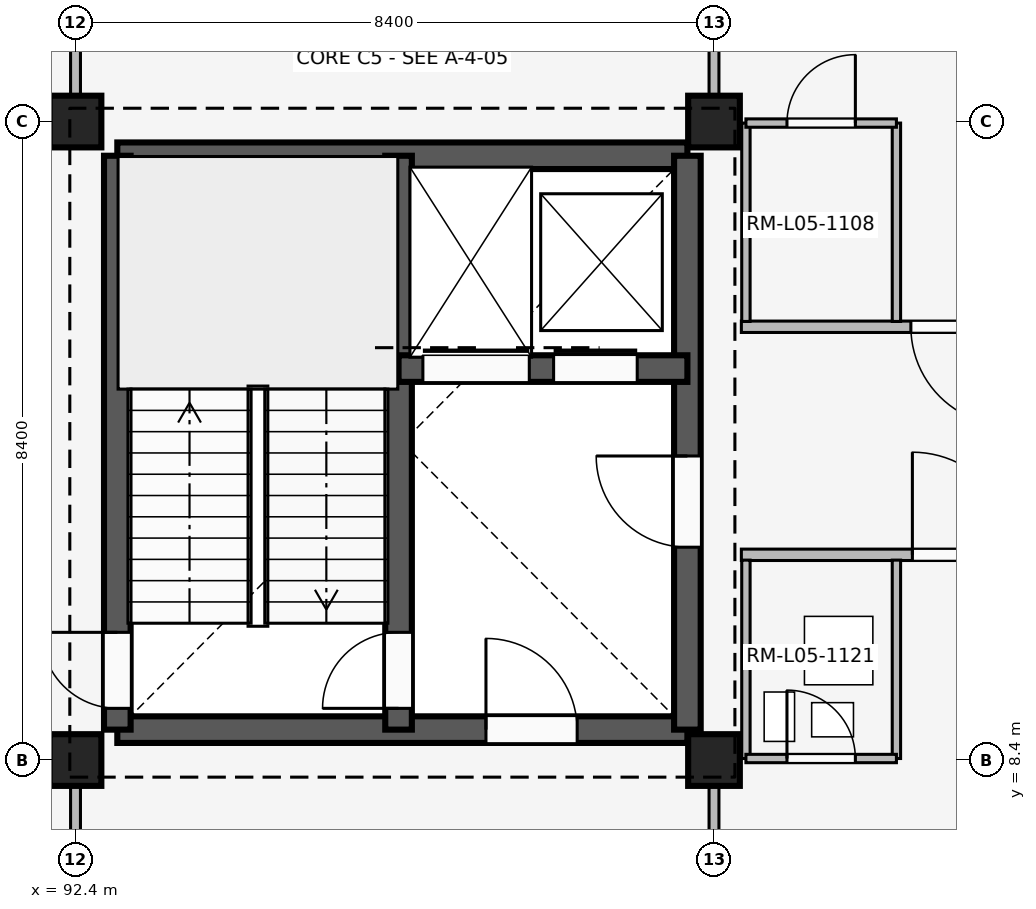
"""IFC4 building model, lengths in metres.
Left out: names, types, materials, properties, quantities, classifications, styles, units other than length and angle.
Written with IfcOpenShell. Run it as: python <this file> out.ifc"""

import sys

from ifc_helpers import new_model, si_unit, direction, frame, frame_2d, origin, origin_2d, place, context, subcontext, project, spatial, rectangle, extrude, element, fill, save


model = new_model("IFC4")
c1 = context("Model", 3, precision=1e-05, world=origin(), true_north=direction((0.0, 1.0)))
c2 = subcontext(c1, "Body", "Model", "MODEL_VIEW")
j1 = project(units=[si_unit("LENGTHUNIT", "METRE"), si_unit("PLANEANGLEUNIT", "RADIAN")], contexts=[c1])
p1 = place(None, origin())
s1 = spatial("IfcSite", under=j1, at=p1, CompositionType="ELEMENT")
p2 = place(p1, origin())
s2 = spatial("IfcBuilding", under=s1, at=p2, CompositionType="ELEMENT")
p3 = place(p2, frame((0.0, 0.0, 20.4)))
s3 = spatial("IfcBuildingStorey", under=s2, at=p3, CompositionType="ELEMENT", Elevation=20.4)
for number, where, z_axis, x_axis in (
    (1, (92.4, 8.4, 0.0), (0.0, 0.0, 1.0), (1.0, 0.0, 0.0)),
    (2, (92.4, 16.8, 0.0), (0.0, 0.0, 1.0), (1.0, 0.0, 0.0)),
    (3, (100.8, 8.4, 0.0), (0.0, 0.0, 1.0), (1.0, 0.0, 0.0)),
    (4, (100.8, 16.8, 0.0), (0.0, 0.0, 1.0), (1.0, 0.0, 0.0)),
):
    element("IfcColumn", number, at=place(p3, frame(where, z_axis=z_axis, x_axis=x_axis)), inside=s3, PredefinedType="COLUMN", context=c2, shape_type="SweptSolid", body=[
        extrude(rectangle(XDim=0.68, YDim=0.68, at=origin_2d()), origin(), (0.0, 0.0, 1.0), 4.2),
    ])
p4 = place(p3, frame((92.95, 8.8, 0.0), z_axis=(0.0, 0.0, 1.0), x_axis=(1.0, 0.0, 0.0)))
e5 = element("IfcWall", 5, at=p4, inside=s3, PredefinedType="SHEAR", context=c2, shape_type="SweptSolid", body=[
    extrude(rectangle(XDim=7.5, YDim=0.35, at=frame_2d((3.75, 0.0))), origin(), (0.0, 0.0, 1.0), 3.92),
])
p5 = place(p4, frame((4.85, 0.0, 0.0)))
e6 = element("IfcOpeningElement", 6, at=p5, cuts=e5, PredefinedType="OPENING", context=c2, shape_type="SweptSolid", body=[
    extrude(rectangle(XDim=1.2, YDim=2.2, at=frame_2d((0.6, 1.1))), frame((0.0, 0.185, 0.0), z_axis=(0.0, -1.0, 0.0), x_axis=(1.0, 0.0, 0.0)), (0.0, 0.0, 1.0), 0.37),
])
p6 = place(p3, frame((92.95, 16.35, 0.0), z_axis=(0.0, 0.0, 1.0), x_axis=(1.0, 0.0, 0.0)))
e7 = element("IfcWall", 7, at=p6, inside=s3, PredefinedType="SHEAR", context=c2, shape_type="SweptSolid", body=[
    extrude(rectangle(XDim=7.5, YDim=0.35, at=frame_2d((3.75, 0.0))), origin(), (0.0, 0.0, 1.0), 3.92),
])
p7 = place(p3, frame((92.95, 8.8, 0.0), z_axis=(0.0, 0.0, 1.0), x_axis=(0.0, 1.0, 0.0)))
e8 = element("IfcWall", 8, at=p7, inside=s3, PredefinedType="SHEAR", context=c2, shape_type="SweptSolid", body=[
    extrude(rectangle(XDim=7.55, YDim=0.35, at=frame_2d((3.775, 0.0))), origin(), (0.0, 0.0, 1.0), 3.92),
])
p8 = place(p7, frame((0.28, 0.0, 0.0)))
e9 = element("IfcOpeningElement", 9, at=p8, cuts=e8, PredefinedType="OPENING", context=c2, shape_type="SweptSolid", body=[
    extrude(rectangle(XDim=1.0, YDim=2.15, at=frame_2d((0.5, 1.075))), frame((0.0, 0.185, 0.0), z_axis=(0.0, -1.0, 0.0), x_axis=(1.0, 0.0, 0.0)), (0.0, 0.0, 1.0), 0.37),
])
p9 = place(p3, frame((100.45, 8.8, 0.0), z_axis=(0.0, 0.0, 1.0), x_axis=(0.0, 1.0, 0.0)))
e10 = element("IfcWall", 10, at=p9, inside=s3, PredefinedType="SHEAR", context=c2, shape_type="SweptSolid", body=[
    extrude(rectangle(XDim=7.55, YDim=0.35, at=frame_2d((3.775, 0.0))), origin(), (0.0, 0.0, 1.0), 3.92),
])
p10 = place(p9, frame((2.4, 0.0, 0.0)))
e11 = element("IfcOpeningElement", 11, at=p10, cuts=e10, PredefinedType="OPENING", context=c2, shape_type="SweptSolid", body=[
    extrude(rectangle(XDim=1.2, YDim=2.2, at=frame_2d((0.6, 1.1))), frame((0.0, 0.185, 0.0), z_axis=(0.0, -1.0, 0.0), x_axis=(1.0, 0.0, 0.0)), (0.0, 0.0, 1.0), 0.37),
])
p11 = place(p3, frame((96.65, 8.8, 0.0), z_axis=(0.0, 0.0, 1.0), x_axis=(0.0, 1.0, 0.0)))
e12 = element("IfcWall", 12, at=p11, inside=s3, PredefinedType="SHEAR", context=c2, shape_type="SweptSolid", body=[
    extrude(rectangle(XDim=7.55, YDim=0.35, at=frame_2d((3.775, 0.0))), origin(), (0.0, 0.0, 1.0), 3.92),
])
p12 = place(p11, frame((0.28, 0.0, 0.0)))
e13 = element("IfcOpeningElement", 13, at=p12, cuts=e12, PredefinedType="OPENING", context=c2, shape_type="SweptSolid", body=[
    extrude(rectangle(XDim=1.0, YDim=2.15, at=frame_2d((0.5, 1.075))), frame((0.0, 0.185, 0.0), z_axis=(0.0, -1.0, 0.0), x_axis=(1.0, 0.0, 0.0)), (0.0, 0.0, 1.0), 0.37),
])
p13 = place(p3, frame((96.65, 13.55, 0.0), z_axis=(0.0, 0.0, 1.0), x_axis=(1.0, 0.0, 0.0)))
e14 = element("IfcWall", 14, at=p13, inside=s3, PredefinedType="SHEAR", context=c2, shape_type="SweptSolid", body=[
    extrude(rectangle(XDim=3.8, YDim=0.35, at=frame_2d((1.9, 0.0))), origin(), (0.0, 0.0, 1.0), 3.92),
])
p14 = place(p13, frame((0.32, 0.0, 0.0)))
e15 = element("IfcOpeningElement", 15, at=p14, cuts=e14, PredefinedType="OPENING", context=c2, shape_type="SweptSolid", body=[
    extrude(rectangle(XDim=1.4, YDim=2.25, at=frame_2d((0.7, 1.125))), frame((0.0, 0.185, 0.0), z_axis=(0.0, -1.0, 0.0), x_axis=(1.0, 0.0, 0.0)), (0.0, 0.0, 1.0), 0.37),
])
p15 = place(p13, frame((2.04, 0.0, 0.0)))
e16 = element("IfcOpeningElement", 16, at=p15, cuts=e14, PredefinedType="OPENING", context=c2, shape_type="SweptSolid", body=[
    extrude(rectangle(XDim=1.1, YDim=2.15, at=frame_2d((0.55, 1.075))), frame((0.0, 0.185, 0.0), z_axis=(0.0, -1.0, 0.0), x_axis=(1.0, 0.0, 0.0)), (0.0, 0.0, 1.0), 0.37),
])
p16 = place(p3, frame((92.4, 0.14, 0.0), z_axis=(0.0, 0.0, 1.0), x_axis=(0.0, 1.0, 0.0)))
e17 = element("IfcWall", 17, at=p16, inside=s3, PredefinedType="PARTITIONING", context=c2, shape_type="SweptSolid", body=[
    extrude(rectangle(XDim=8.21, YDim=0.13, at=frame_2d((4.105, 0.0))), origin(), (0.0, 0.0, 1.0), 3.32),
])
p17 = place(p16, frame((3.64, 0.0, 0.0)))
e18 = element("IfcOpeningElement", 18, at=p17, cuts=e17, PredefinedType="OPENING", context=c2, shape_type="SweptSolid", body=[
    extrude(rectangle(XDim=1.08, YDim=2.15, at=frame_2d((0.54, 1.075))), frame((0.0, 0.075, 0.0), z_axis=(0.0, -1.0, 0.0), x_axis=(1.0, 0.0, 0.0)), (0.0, 0.0, 1.0), 0.15),
])
p18 = place(p3, frame((92.4, 17.15, 0.0), z_axis=(0.0, 0.0, 1.0), x_axis=(0.0, 1.0, 0.0)))
e19 = element("IfcWall", 19, at=p18, inside=s3, PredefinedType="PARTITIONING", context=c2, shape_type="SweptSolid", body=[
    extrude(rectangle(XDim=7.91, YDim=0.13, at=frame_2d((3.955, 0.0))), origin(), (0.0, 0.0, 1.0), 3.32),
])
p19 = place(p18, frame((3.4, 0.0, 0.0)))
e20 = element("IfcOpeningElement", 20, at=p19, cuts=e19, PredefinedType="OPENING", context=c2, shape_type="SweptSolid", body=[
    extrude(rectangle(XDim=1.05, YDim=2.2, at=frame_2d((0.525, 1.1))), frame((0.0, 0.075, 0.0), z_axis=(0.0, -1.0, 0.0), x_axis=(1.0, 0.0, 0.0)), (0.0, 0.0, 1.0), 0.15),
])
p20 = place(p3, frame((100.8, 0.14, 0.0), z_axis=(0.0, 0.0, 1.0), x_axis=(0.0, 1.0, 0.0)))
e21 = element("IfcWall", 21, at=p20, inside=s3, PredefinedType="PARTITIONING", context=c2, shape_type="SweptSolid", body=[
    extrude(rectangle(XDim=8.21, YDim=0.13, at=frame_2d((4.105, 0.0))), origin(), (0.0, 0.0, 1.0), 3.32),
])
p21 = place(p20, frame((3.64, 0.0, 0.0)))
e22 = element("IfcOpeningElement", 22, at=p21, cuts=e21, PredefinedType="OPENING", context=c2, shape_type="SweptSolid", body=[
    extrude(rectangle(XDim=1.08, YDim=2.15, at=frame_2d((0.54, 1.075))), frame((0.0, 0.075, 0.0), z_axis=(0.0, -1.0, 0.0), x_axis=(1.0, 0.0, 0.0)), (0.0, 0.0, 1.0), 0.15),
])
p22 = place(p3, frame((100.8, 17.15, 0.0), z_axis=(0.0, 0.0, 1.0), x_axis=(0.0, 1.0, 0.0)))
e23 = element("IfcWall", 23, at=p22, inside=s3, PredefinedType="PARTITIONING", context=c2, shape_type="SweptSolid", body=[
    extrude(rectangle(XDim=7.91, YDim=0.13, at=frame_2d((3.955, 0.0))), origin(), (0.0, 0.0, 1.0), 3.32),
])
p23 = place(p22, frame((3.4, 0.0, 0.0)))
e24 = element("IfcOpeningElement", 24, at=p23, cuts=e23, PredefinedType="OPENING", context=c2, shape_type="SweptSolid", body=[
    extrude(rectangle(XDim=1.05, YDim=2.2, at=frame_2d((0.525, 1.1))), frame((0.0, 0.075, 0.0), z_axis=(0.0, -1.0, 0.0), x_axis=(1.0, 0.0, 0.0)), (0.0, 0.0, 1.0), 0.15),
])
p24 = place(p3, frame((101.16, 11.1, 0.0), z_axis=(0.0, 0.0, 1.0), x_axis=(1.0, 0.0, 0.0)))
e25 = element("IfcWall", 25, at=p24, inside=s3, PredefinedType="PARTITIONING", context=c2, shape_type="SweptSolid", body=[
    extrude(rectangle(XDim=7.96, YDim=0.15, at=frame_2d((3.98, 0.0))), origin(), (0.0, 0.0, 1.0), 3.32),
])
p25 = place(p24, frame((2.25, 0.0, 0.0)))
e26 = element("IfcOpeningElement", 26, at=p25, cuts=e25, PredefinedType="OPENING", context=c2, shape_type="SweptSolid", body=[
    extrude(rectangle(XDim=1.35, YDim=2.25, at=frame_2d((0.675, 1.125))), frame((0.0, 0.085, 0.0), z_axis=(0.0, -1.0, 0.0), x_axis=(1.0, 0.0, 0.0)), (0.0, 0.0, 1.0), 0.17),
])
p26 = place(p24, frame((5.95, 0.0, 0.0)))
e27 = element("IfcOpeningElement", 27, at=p26, cuts=e25, PredefinedType="OPENING", context=c2, shape_type="SweptSolid", body=[
    extrude(rectangle(XDim=1.35, YDim=2.25, at=frame_2d((0.675, 1.125))), frame((0.0, 0.085, 0.0), z_axis=(0.0, -1.0, 0.0), x_axis=(1.0, 0.0, 0.0)), (0.0, 0.0, 1.0), 0.17),
])
for number, where, z_axis, x_axis in (
    (28, (101.22, 8.42, 0.0), (0.0, 0.0, 1.0), (0.0, 1.0, 0.0)),
    (29, (103.2, 8.42, 0.0), (0.0, 0.0, 1.0), (0.0, 1.0, 0.0)),
):
    element("IfcWall", number, at=place(p3, frame(where, z_axis=z_axis, x_axis=x_axis)), inside=s3, PredefinedType="PARTITIONING", context=c2, shape_type="SweptSolid", body=[
        extrude(rectangle(XDim=2.61, YDim=0.11, at=frame_2d((1.305, 0.0))), origin(), (0.0, 0.0, 1.0), 3.32),
    ])
p27 = place(p3, frame((101.22, 8.42, 0.0), z_axis=(0.0, 0.0, 1.0), x_axis=(1.0, 0.0, 0.0)))
e30 = element("IfcWall", 30, at=p27, inside=s3, PredefinedType="PARTITIONING", context=c2, shape_type="SweptSolid", body=[
    extrude(rectangle(XDim=1.98, YDim=0.11, at=frame_2d((0.99, 0.0))), origin(), (0.0, 0.0, 1.0), 3.32),
])
p28 = place(p27, frame((0.54, 0.0, 0.0)))
e31 = element("IfcOpeningElement", 31, at=p28, cuts=e30, PredefinedType="OPENING", context=c2, shape_type="SweptSolid", body=[
    extrude(rectangle(XDim=0.9, YDim=2.1, at=frame_2d((0.45, 1.05))), frame((0.0, 0.065, 0.0), z_axis=(0.0, -1.0, 0.0), x_axis=(1.0, 0.0, 0.0)), (0.0, 0.0, 1.0), 0.13),
])
p29 = place(p3, frame((109.12, 14.1, 0.0), z_axis=(0.0, 0.0, 1.0), x_axis=(-1.0, 0.0, 0.0)))
e32 = element("IfcWall", 32, at=p29, inside=s3, PredefinedType="PARTITIONING", context=c2, shape_type="SweptSolid", body=[
    extrude(rectangle(XDim=7.96, YDim=0.15, at=frame_2d((3.98, 0.0))), origin(), (0.0, 0.0, 1.0), 3.32),
])
p30 = place(p29, frame((0.73, 0.0, 0.0)))
e33 = element("IfcOpeningElement", 33, at=p30, cuts=e32, PredefinedType="OPENING", context=c2, shape_type="SweptSolid", body=[
    extrude(rectangle(XDim=1.3, YDim=2.25, at=frame_2d((0.65, 1.125))), frame((0.0, 0.085, 0.0), z_axis=(0.0, -1.0, 0.0), x_axis=(1.0, 0.0, 0.0)), (0.0, 0.0, 1.0), 0.17),
])
p31 = place(p29, frame((4.43, 0.0, 0.0)))
e34 = element("IfcOpeningElement", 34, at=p31, cuts=e32, PredefinedType="OPENING", context=c2, shape_type="SweptSolid", body=[
    extrude(rectangle(XDim=1.3, YDim=2.25, at=frame_2d((0.65, 1.125))), frame((0.0, 0.085, 0.0), z_axis=(0.0, -1.0, 0.0), x_axis=(1.0, 0.0, 0.0)), (0.0, 0.0, 1.0), 0.17),
])
for number, where, z_axis, x_axis in (
    (35, (101.22, 14.17, 0.0), (0.0, 0.0, 1.0), (0.0, 1.0, 0.0)),
    (36, (103.2, 14.17, 0.0), (0.0, 0.0, 1.0), (0.0, 1.0, 0.0)),
):
    element("IfcWall", number, at=place(p3, frame(where, z_axis=z_axis, x_axis=x_axis)), inside=s3, PredefinedType="PARTITIONING", context=c2, shape_type="SweptSolid", body=[
        extrude(rectangle(XDim=2.61, YDim=0.11, at=frame_2d((1.305, 0.0))), origin(), (0.0, 0.0, 1.0), 3.32),
    ])
p32 = place(p3, frame((101.22, 16.78, 0.0), z_axis=(0.0, 0.0, 1.0), x_axis=(1.0, 0.0, 0.0)))
e37 = element("IfcWall", 37, at=p32, inside=s3, PredefinedType="PARTITIONING", context=c2, shape_type="SweptSolid", body=[
    extrude(rectangle(XDim=1.98, YDim=0.11, at=frame_2d((0.99, 0.0))), origin(), (0.0, 0.0, 1.0), 3.32),
])
p33 = place(p32, frame((0.54, 0.0, 0.0)))
e38 = element("IfcOpeningElement", 38, at=p33, cuts=e37, PredefinedType="OPENING", context=c2, shape_type="SweptSolid", body=[
    extrude(rectangle(XDim=0.9, YDim=2.1, at=frame_2d((0.45, 1.05))), frame((0.0, 0.065, 0.0), z_axis=(0.0, -1.0, 0.0), x_axis=(1.0, 0.0, 0.0)), (0.0, 0.0, 1.0), 0.13),
])
p34 = place(p10, origin())
e39 = element("IfcDoor", 39, at=p34, inside=s3, OperationType="SINGLE_SWING_RIGHT", PredefinedType="DOOR", context=c2, shape_type="SweptSolid", body=[
    extrude(rectangle(XDim=1.2, YDim=2.2, at=frame_2d((0.6, 1.1))), frame((0.0, 0.025, 0.0), z_axis=(0.0, -1.0, 0.0), x_axis=(1.0, 0.0, 0.0)), (0.0, 0.0, 1.0), 0.05),
])
fill(e11, e39)
p35 = place(p5, origin())
e40 = element("IfcDoor", 40, at=p35, inside=s3, OperationType="SINGLE_SWING_LEFT", PredefinedType="DOOR", context=c2, shape_type="SweptSolid", body=[
    extrude(rectangle(XDim=1.2, YDim=2.2, at=frame_2d((0.6, 1.1))), frame((0.0, 0.025, 0.0), z_axis=(0.0, -1.0, 0.0), x_axis=(1.0, 0.0, 0.0)), (0.0, 0.0, 1.0), 0.05),
])
fill(e6, e40)
p36 = place(p8, origin())
e41 = element("IfcDoor", 41, at=p36, inside=s3, OperationType="SINGLE_SWING_RIGHT", PredefinedType="DOOR", context=c2, shape_type="SweptSolid", body=[
    extrude(rectangle(XDim=1.0, YDim=2.15, at=frame_2d((0.5, 1.075))), frame((0.0, 0.025, 0.0), z_axis=(0.0, -1.0, 0.0), x_axis=(1.0, 0.0, 0.0)), (0.0, 0.0, 1.0), 0.05),
])
fill(e9, e41)
p37 = place(p12, origin())
e42 = element("IfcDoor", 42, at=p37, inside=s3, OperationType="SINGLE_SWING_LEFT", PredefinedType="DOOR", context=c2, shape_type="SweptSolid", body=[
    extrude(rectangle(XDim=1.0, YDim=2.15, at=frame_2d((0.5, 1.075))), frame((0.0, 0.025, 0.0), z_axis=(0.0, -1.0, 0.0), x_axis=(1.0, 0.0, 0.0)), (0.0, 0.0, 1.0), 0.05),
])
fill(e13, e42)
p38 = place(p14, origin())
e43 = element("IfcDoor", 43, at=p38, inside=s3, OperationType="SLIDING_TO_LEFT", PredefinedType="DOOR", context=c2, shape_type="SweptSolid", body=[
    extrude(rectangle(XDim=1.4, YDim=2.25, at=frame_2d((0.7, 1.125))), frame((0.0, 0.025, 0.0), z_axis=(0.0, -1.0, 0.0), x_axis=(1.0, 0.0, 0.0)), (0.0, 0.0, 1.0), 0.05),
])
fill(e15, e43)
p39 = place(p15, origin())
e44 = element("IfcDoor", 44, at=p39, inside=s3, OperationType="SLIDING_TO_LEFT", PredefinedType="DOOR", context=c2, shape_type="SweptSolid", body=[
    extrude(rectangle(XDim=1.1, YDim=2.15, at=frame_2d((0.55, 1.075))), frame((0.0, 0.025, 0.0), z_axis=(0.0, -1.0, 0.0), x_axis=(1.0, 0.0, 0.0)), (0.0, 0.0, 1.0), 0.05),
])
fill(e16, e44)
p40 = place(p25, origin())
e45 = element("IfcDoor", 45, at=p40, inside=s3, OperationType="SINGLE_SWING_LEFT", PredefinedType="DOOR", context=c2, shape_type="SweptSolid", body=[
    extrude(rectangle(XDim=1.35, YDim=2.25, at=frame_2d((0.675, 1.125))), frame((0.0, 0.025, 0.0), z_axis=(0.0, -1.0, 0.0), x_axis=(1.0, 0.0, 0.0)), (0.0, 0.0, 1.0), 0.05),
])
fill(e26, e45)
p41 = place(p28, origin())
e46 = element("IfcDoor", 46, at=p41, inside=s3, OperationType="SINGLE_SWING_LEFT", PredefinedType="DOOR", context=c2, shape_type="SweptSolid", body=[
    extrude(rectangle(XDim=0.9, YDim=2.1, at=frame_2d((0.45, 1.05))), frame((0.0, 0.025, 0.0), z_axis=(0.0, -1.0, 0.0), x_axis=(1.0, 0.0, 0.0)), (0.0, 0.0, 1.0), 0.05),
])
fill(e31, e46)
p42 = place(p31, origin())
e47 = element("IfcDoor", 47, at=p42, inside=s3, OperationType="SINGLE_SWING_LEFT", PredefinedType="DOOR", context=c2, shape_type="SweptSolid", body=[
    extrude(rectangle(XDim=1.3, YDim=2.25, at=frame_2d((0.65, 1.125))), frame((0.0, 0.025, 0.0), z_axis=(0.0, -1.0, 0.0), x_axis=(1.0, 0.0, 0.0)), (0.0, 0.0, 1.0), 0.05),
])
fill(e34, e47)
p43 = place(p33, origin())
e48 = element("IfcDoor", 48, at=p43, inside=s3, OperationType="SINGLE_SWING_RIGHT", PredefinedType="DOOR", context=c2, shape_type="SweptSolid", body=[
    extrude(rectangle(XDim=0.9, YDim=2.1, at=frame_2d((0.45, 1.05))), frame((0.0, 0.025, 0.0), z_axis=(0.0, -1.0, 0.0), x_axis=(1.0, 0.0, 0.0)), (0.0, 0.0, 1.0), 0.05),
])
fill(e38, e48)
save(model, sys.argv[1])
